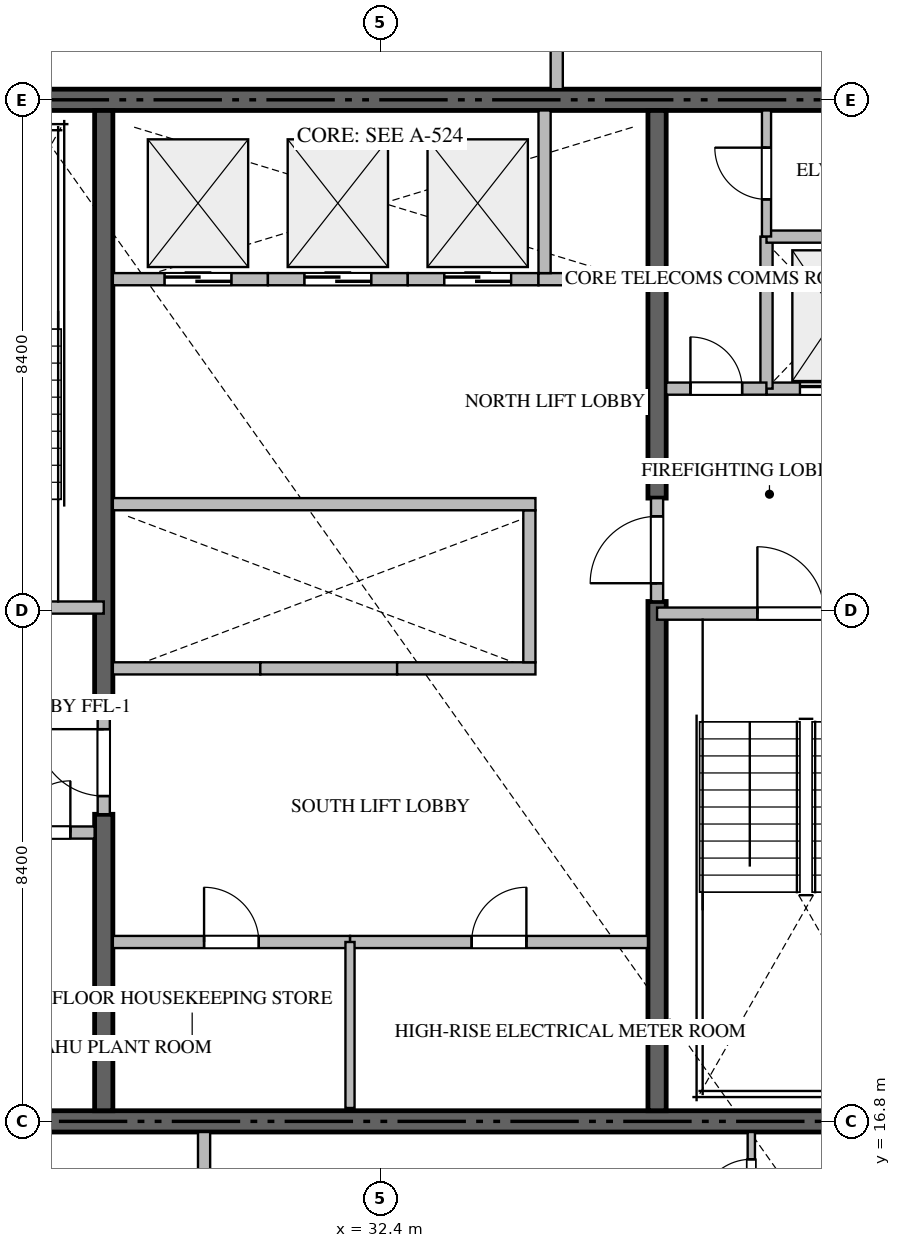
"""IFC4 building model, lengths in metres.
Left out: names, types, materials, properties, quantities, classifications, styles, units other than length and angle.
Written with IfcOpenShell. Run it as: python <this file> out.ifc"""

import sys

from ifc_helpers import new_model, si_unit, direction, frame, frame_2d, origin, place, context, subcontext, project, spatial, rectangle, extrude, source, transform, mapped, element, fill, save


model = new_model("IFC4")
c1 = context("Model", 3, precision=1e-05, world=origin(), true_north=direction((0.0, 1.0)))
c2 = subcontext(c1, "Body", "Model", "MODEL_VIEW")
j1 = project(units=[si_unit("LENGTHUNIT", "METRE"), si_unit("PLANEANGLEUNIT", "RADIAN")], contexts=[c1])
p1 = place(None, origin())
s1 = spatial("IfcSite", under=j1, at=p1, CompositionType="ELEMENT")
p2 = place(p1, origin())
s2 = spatial("IfcBuilding", under=s1, at=p2, CompositionType="ELEMENT")
p3 = place(p2, frame((0.0, 0.0, 210.45)))
s3 = spatial("IfcBuildingStorey", under=s2, at=p3, CompositionType="ELEMENT", Elevation=210.45)
for number, where, z_axis, x_axis in (
    (1, (23.4, 16.8, -0.44), (0.0, 0.0, 1.0), (1.0, 0.0, 0.0)),
    (2, (41.4, 33.6, -0.44), (0.0, 0.0, 1.0), (-1.0, 0.0, 0.0)),
):
    element("IfcWall", number, at=place(p3, frame(where, z_axis=z_axis, x_axis=x_axis)), inside=s3, PredefinedType="SHEAR", context=c2, shape_type="SweptSolid", body=[
        extrude(rectangle(XDim=18.0, YDim=0.35, at=frame_2d((9.0, 0.0))), origin(), (0.0, 0.0, 1.0), 4.028),
    ])
p4 = place(p3, frame((27.85, 16.975, -0.44), z_axis=(0.0, 0.0, 1.0), x_axis=(0.0, 1.0, 0.0)))
e3 = element("IfcWall", 3, at=p4, inside=s3, PredefinedType="SHEAR", context=c2, shape_type="SweptSolid", body=[
    extrude(rectangle(XDim=4.875, YDim=0.3, at=frame_2d((2.438, 0.0))), origin(), (0.0, 0.0, 1.0), 4.028),
])
p5 = place(p3, frame((27.85, 23.55, -0.44), z_axis=(0.0, 0.0, 1.0), x_axis=(0.0, 1.0, 0.0)))
e4 = element("IfcWall", 4, at=p5, inside=s3, PredefinedType="SHEAR", context=c2, shape_type="SweptSolid", body=[
    extrude(rectangle(XDim=9.875, YDim=0.3, at=frame_2d((4.938, 0.0))), origin(), (0.0, 0.0, 1.0), 4.028),
])
p6 = place(p3, frame((36.95, 16.975, -0.44), z_axis=(0.0, 0.0, 1.0), x_axis=(0.0, 1.0, 0.0)))
e5 = element("IfcWall", 5, at=p6, inside=s3, PredefinedType="SHEAR", context=c2, shape_type="SweptSolid", body=[
    extrude(rectangle(XDim=8.375, YDim=0.3, at=frame_2d((4.188, 0.0))), origin(), (0.0, 0.0, 1.0), 4.028),
])
p7 = place(p3, frame((36.95, 27.05, -0.44), z_axis=(0.0, 0.0, 1.0), x_axis=(0.0, 1.0, 0.0)))
e6 = element("IfcWall", 6, at=p7, inside=s3, PredefinedType="SHEAR", context=c2, shape_type="SweptSolid", body=[
    extrude(rectangle(XDim=6.375, YDim=0.3, at=frame_2d((3.188, 0.0))), origin(), (0.0, 0.0, 1.0), 4.028),
])
p8 = place(p3, frame((23.4, 25.25, 0.0), z_axis=(0.0, 0.0, 1.0), x_axis=(1.0, 0.0, 0.0)))
e7 = element("IfcWall", 7, at=p8, inside=s3, PredefinedType="STANDARD", context=c2, shape_type="SweptSolid", body=[
    extrude(rectangle(XDim=4.45, YDim=0.2, at=frame_2d((2.225, 0.0))), origin(), (0.0, 0.0, 1.0), 3.59),
])
p9 = place(p8, frame((1.65, 0.0, 0.0)))
e8 = element("IfcOpeningElement", 8, at=p9, cuts=e7, PredefinedType="OPENING", context=c2, shape_type="SweptSolid", body=[
    extrude(rectangle(XDim=1.1, YDim=2.15, at=frame_2d((0.55, 1.075))), frame((0.0, 0.11, 0.0), z_axis=(0.0, -1.0, 0.0), x_axis=(1.0, 0.0, 0.0)), (0.0, 0.0, 1.0), 0.22),
])
p10 = place(p3, frame((36.95, 25.15, 0.0), z_axis=(0.0, 0.0, 1.0), x_axis=(1.0, 0.0, 0.0)))
e9 = element("IfcWall", 9, at=p10, inside=s3, PredefinedType="STANDARD", context=c2, shape_type="SweptSolid", body=[
    extrude(rectangle(XDim=4.45, YDim=0.2, at=frame_2d((2.225, 0.0))), origin(), (0.0, 0.0, 1.0), 3.59),
])
p11 = place(p10, frame((1.65, 0.0, 0.0)))
e10 = element("IfcOpeningElement", 10, at=p11, cuts=e9, PredefinedType="OPENING", context=c2, shape_type="SweptSolid", body=[
    extrude(rectangle(XDim=1.1, YDim=2.15, at=frame_2d((0.55, 1.075))), frame((0.0, 0.11, 0.0), z_axis=(0.0, -1.0, 0.0), x_axis=(1.0, 0.0, 0.0)), (0.0, 0.0, 1.0), 0.22),
])
p12 = place(p3, frame((38.75, 28.85, 0.0), z_axis=(0.0, 0.0, 1.0), x_axis=(1.0, 0.0, 0.0)))
e11 = element("IfcWall", 11, at=p12, inside=s3, PredefinedType="STANDARD", context=c2, shape_type="SweptSolid", body=[
    extrude(rectangle(XDim=2.475, YDim=0.2, at=frame_2d((1.238, 0.0))), origin(), (0.0, 0.0, 1.0), 3.59),
])
p13 = place(p12, frame((0.55, 0.0, 0.0)))
e12 = element("IfcOpeningElement", 12, at=p13, cuts=e11, PredefinedType="OPENING", context=c2, shape_type="SweptSolid", body=[
    extrude(rectangle(XDim=1.2, YDim=2.2, at=frame_2d((0.6, 1.1))), frame((0.0, 0.11, 0.0), z_axis=(0.0, -1.0, 0.0), x_axis=(1.0, 0.0, 0.0)), (0.0, 0.0, 1.0), 0.22),
])
p14 = place(p3, frame((28.0, 24.25, 0.0), z_axis=(0.0, 0.0, 1.0), x_axis=(1.0, 0.0, 0.0)))
e13 = element("IfcWall", 13, at=p14, inside=s3, PredefinedType="STANDARD", context=c2, shape_type="SweptSolid", body=[
    extrude(rectangle(XDim=2.425, YDim=0.2, at=frame_2d((1.212, 0.0))), origin(), (0.0, 0.0, 1.0), 3.59),
])
p15 = place(p3, frame((30.425, 24.25, 0.0), z_axis=(0.0, 0.0, 1.0), x_axis=(1.0, 0.0, 0.0)))
e14 = element("IfcWall", 14, at=p15, inside=s3, PredefinedType="STANDARD", context=c2, shape_type="SweptSolid", body=[
    extrude(rectangle(XDim=2.25, YDim=0.2, at=frame_2d((1.125, 0.0))), origin(), (0.0, 0.0, 1.0), 3.59),
])
p16 = place(p3, frame((32.675, 24.25, 0.0), z_axis=(0.0, 0.0, 1.0), x_axis=(1.0, 0.0, 0.0)))
e15 = element("IfcWall", 15, at=p16, inside=s3, PredefinedType="STANDARD", context=c2, shape_type="SweptSolid", body=[
    extrude(rectangle(XDim=2.275, YDim=0.2, at=frame_2d((1.137, 0.0))), origin(), (0.0, 0.0, 1.0), 3.59),
])
p17 = place(p3, frame((34.85, 24.35, 0.0), z_axis=(0.0, 0.0, 1.0), x_axis=(0.0, 1.0, 0.0)))
e16 = element("IfcWall", 16, at=p17, inside=s3, PredefinedType="STANDARD", context=c2, shape_type="SweptSolid", body=[
    extrude(rectangle(XDim=2.5, YDim=0.2, at=frame_2d((1.25, 0.0))), origin(), (0.0, 0.0, 1.0), 3.59),
])
p18 = place(p3, frame((28.0, 30.65, 0.0), z_axis=(0.0, 0.0, 1.0), x_axis=(1.0, 0.0, 0.0)))
e17 = element("IfcWall", 17, at=p18, inside=s3, PredefinedType="STANDARD", context=c2, shape_type="SweptSolid", body=[
    extrude(rectangle(XDim=2.55, YDim=0.2, at=frame_2d((1.275, 0.0))), origin(), (0.0, 0.0, 1.0), 3.59),
])
p19 = place(p18, frame((0.85, 0.0, 0.0)))
e18 = element("IfcOpeningElement", 18, at=p19, cuts=e17, PredefinedType="OPENING", context=c2, shape_type="SweptSolid", body=[
    extrude(rectangle(XDim=1.1, YDim=2.2, at=frame_2d((0.55, 1.1))), frame((0.0, 0.11, 0.0), z_axis=(0.0, -1.0, 0.0), x_axis=(1.0, 0.0, 0.0)), (0.0, 0.0, 1.0), 0.22),
])
p20 = place(p3, frame((30.55, 30.65, 0.0), z_axis=(0.0, 0.0, 1.0), x_axis=(1.0, 0.0, 0.0)))
e19 = element("IfcWall", 19, at=p20, inside=s3, PredefinedType="STANDARD", context=c2, shape_type="SweptSolid", body=[
    extrude(rectangle(XDim=2.3, YDim=0.2, at=frame_2d((1.15, 0.0))), origin(), (0.0, 0.0, 1.0), 3.59),
])
p21 = place(p20, frame((0.6, 0.0, 0.0)))
e20 = element("IfcOpeningElement", 20, at=p21, cuts=e19, PredefinedType="OPENING", context=c2, shape_type="SweptSolid", body=[
    extrude(rectangle(XDim=1.1, YDim=2.2, at=frame_2d((0.55, 1.1))), frame((0.0, 0.11, 0.0), z_axis=(0.0, -1.0, 0.0), x_axis=(1.0, 0.0, 0.0)), (0.0, 0.0, 1.0), 0.22),
])
p22 = place(p3, frame((32.85, 30.65, 0.0), z_axis=(0.0, 0.0, 1.0), x_axis=(1.0, 0.0, 0.0)))
e21 = element("IfcWall", 21, at=p22, inside=s3, PredefinedType="STANDARD", context=c2, shape_type="SweptSolid", body=[
    extrude(rectangle(XDim=2.15, YDim=0.2, at=frame_2d((1.075, 0.0))), origin(), (0.0, 0.0, 1.0), 3.59),
])
p23 = place(p22, frame((0.6, 0.0, 0.0)))
e22 = element("IfcOpeningElement", 22, at=p23, cuts=e21, PredefinedType="OPENING", context=c2, shape_type="SweptSolid", body=[
    extrude(rectangle(XDim=1.1, YDim=2.2, at=frame_2d((0.55, 1.1))), frame((0.0, 0.11, 0.0), z_axis=(0.0, -1.0, 0.0), x_axis=(1.0, 0.0, 0.0)), (0.0, 0.0, 1.0), 0.22),
])
p24 = place(p3, frame((35.0, 30.65, 0.0), z_axis=(0.0, 0.0, 1.0), x_axis=(1.0, 0.0, 0.0)))
e23 = element("IfcWall", 23, at=p24, inside=s3, PredefinedType="STANDARD", context=c2, shape_type="SweptSolid", body=[
    extrude(rectangle(XDim=1.8, YDim=0.2, at=frame_2d((0.9, 0.0))), origin(), (0.0, 0.0, 1.0), 3.59),
])
p25 = place(p3, frame((35.1, 30.75, 0.0), z_axis=(0.0, 0.0, 1.0), x_axis=(0.0, 1.0, 0.0)))
e24 = element("IfcWall", 24, at=p25, inside=s3, PredefinedType="STANDARD", context=c2, shape_type="SweptSolid", body=[
    extrude(rectangle(XDim=2.675, YDim=0.2, at=frame_2d((1.337, 0.0))), origin(), (0.0, 0.0, 1.0), 3.59),
])
p26 = place(p3, frame((26.052, 21.55, 0.0), z_axis=(0.0, 0.0, 1.0), x_axis=(1.0, 0.0, 0.0)))
e25 = element("IfcWall", 25, at=p26, inside=s3, PredefinedType="STANDARD", context=c2, shape_type="SweptSolid", body=[
    extrude(rectangle(XDim=1.648, YDim=0.2, at=frame_2d((0.824, 0.0))), origin(), (0.0, 0.0, 1.0), 3.59),
])
p27 = place(p26, frame((0.399, 0.0, 0.0)))
e26 = element("IfcOpeningElement", 26, at=p27, cuts=e25, PredefinedType="OPENING", context=c2, shape_type="SweptSolid", body=[
    extrude(rectangle(XDim=0.85, YDim=2.1, at=frame_2d((0.425, 1.05))), frame((0.0, 0.11, 0.0), z_axis=(0.0, -1.0, 0.0), x_axis=(1.0, 0.0, 0.0)), (0.0, 0.0, 1.0), 0.22),
])
p28 = place(p3, frame((38.75, 28.85, 0.0), z_axis=(0.0, 0.0, 1.0), x_axis=(0.0, 1.0, 0.0)))
e27 = element("IfcWall", 27, at=p28, inside=s3, PredefinedType="STANDARD", context=c2, shape_type="SweptSolid", body=[
    extrude(rectangle(XDim=2.5, YDim=0.2, at=frame_2d((1.25, 0.0))), origin(), (0.0, 0.0, 1.0), 3.59),
])
p29 = place(p3, frame((38.75, 31.35, 0.0), z_axis=(0.0, 0.0, 1.0), x_axis=(1.0, 0.0, 0.0)))
e28 = element("IfcWall", 28, at=p29, inside=s3, PredefinedType="STANDARD", context=c2, shape_type="SweptSolid", body=[
    extrude(rectangle(XDim=2.475, YDim=0.2, at=frame_2d((1.238, 0.0))), origin(), (0.0, 0.0, 1.0), 3.59),
])
p30 = place(p3, frame((37.1, 28.85, 0.0), z_axis=(0.0, 0.0, 1.0), x_axis=(1.0, 0.0, 0.0)))
e29 = element("IfcWall", 29, at=p30, inside=s3, PredefinedType="STANDARD", context=c2, shape_type="SweptSolid", body=[
    extrude(rectangle(XDim=1.648, YDim=0.2, at=frame_2d((0.824, 0.0))), origin(), (0.0, 0.0, 1.0), 3.59),
])
p31 = place(p30, frame((0.399, 0.0, 0.0)))
e30 = element("IfcOpeningElement", 30, at=p31, cuts=e29, PredefinedType="OPENING", context=c2, shape_type="SweptSolid", body=[
    extrude(rectangle(XDim=0.85, YDim=2.1, at=frame_2d((0.425, 1.05))), frame((0.0, 0.11, 0.0), z_axis=(0.0, -1.0, 0.0), x_axis=(1.0, 0.0, 0.0)), (0.0, 0.0, 1.0), 0.22),
])
p32 = place(p3, frame((27.85, 21.852, 0.0), z_axis=(0.0, 0.0, 1.0), x_axis=(0.0, 1.0, 0.0)))
e31 = element("IfcWall", 31, at=p32, inside=s3, PredefinedType="STANDARD", context=c2, shape_type="SweptSolid", body=[
    extrude(rectangle(XDim=1.696, YDim=0.2, at=frame_2d((0.848, 0.0))), origin(), (0.0, 0.0, 1.0), 3.59),
])
p33 = place(p32, frame((0.298, 0.0, 0.0)))
e32 = element("IfcOpeningElement", 32, at=p33, cuts=e31, PredefinedType="OPENING", context=c2, shape_type="SweptSolid", body=[
    extrude(rectangle(XDim=1.1, YDim=2.15, at=frame_2d((0.55, 1.075))), frame((0.0, 0.11, 0.0), z_axis=(0.0, -1.0, 0.0), x_axis=(1.0, 0.0, 0.0)), (0.0, 0.0, 1.0), 0.22),
])
p34 = place(p3, frame((36.95, 25.352, 0.0), z_axis=(0.0, 0.0, 1.0), x_axis=(0.0, 1.0, 0.0)))
e33 = element("IfcWall", 33, at=p34, inside=s3, PredefinedType="STANDARD", context=c2, shape_type="SweptSolid", body=[
    extrude(rectangle(XDim=1.696, YDim=0.2, at=frame_2d((0.848, 0.0))), origin(), (0.0, 0.0, 1.0), 3.59),
])
p35 = place(p34, frame((0.298, 0.0, 0.0)))
e34 = element("IfcOpeningElement", 34, at=p35, cuts=e33, PredefinedType="OPENING", context=c2, shape_type="SweptSolid", body=[
    extrude(rectangle(XDim=1.1, YDim=2.15, at=frame_2d((0.55, 1.075))), frame((0.0, 0.11, 0.0), z_axis=(0.0, -1.0, 0.0), x_axis=(1.0, 0.0, 0.0)), (0.0, 0.0, 1.0), 0.22),
])
p36 = place(p3, frame((28.0, 26.95, 0.0), z_axis=(0.0, 0.0, 1.0), x_axis=(1.0, 0.0, 0.0)))
e35 = element("IfcWall", 35, at=p36, inside=s3, PredefinedType="STANDARD", context=c2, shape_type="SweptSolid", body=[
    extrude(rectangle(XDim=6.95, YDim=0.2, at=frame_2d((3.475, 0.0))), origin(), (0.0, 0.0, 1.0), 3.59),
])
p37 = place(p3, frame((38.75, 31.352, 0.0), z_axis=(0.0, 0.0, 1.0), x_axis=(0.0, 1.0, 0.0)))
e36 = element("IfcWall", 36, at=p37, inside=s3, PredefinedType="PARTITIONING", context=c2, shape_type="SweptSolid", body=[
    extrude(rectangle(XDim=2.073, YDim=0.15, at=frame_2d((1.037, 0.0))), origin(), (0.0, 0.0, 1.0), 3.59),
])
p38 = place(p37, frame((0.611, 0.0, 0.0)))
e37 = element("IfcOpeningElement", 37, at=p38, cuts=e36, PredefinedType="OPENING", context=c2, shape_type="SweptSolid", body=[
    extrude(rectangle(XDim=0.85, YDim=2.1, at=frame_2d((0.425, 1.05))), frame((0.0, 0.085, 0.0), z_axis=(0.0, -1.0, 0.0), x_axis=(1.0, 0.0, 0.0)), (0.0, 0.0, 1.0), 0.17),
])
p39 = place(p3, frame((28.0, 19.75, 0.0), z_axis=(0.0, 0.0, 1.0), x_axis=(1.0, 0.0, 0.0)))
e38 = element("IfcWall", 38, at=p39, inside=s3, PredefinedType="STANDARD", context=c2, shape_type="SweptSolid", body=[
    extrude(rectangle(XDim=3.9, YDim=0.2, at=frame_2d((1.95, 0.0))), origin(), (0.0, 0.0, 1.0), 3.59),
])
p40 = place(p39, frame((1.5, 0.0, 0.0)))
e39 = element("IfcOpeningElement", 39, at=p40, cuts=e38, PredefinedType="OPENING", context=c2, shape_type="SweptSolid", body=[
    extrude(rectangle(XDim=0.9, YDim=2.1, at=frame_2d((0.45, 1.05))), frame((0.0, 0.11, 0.0), z_axis=(0.0, -1.0, 0.0), x_axis=(1.0, 0.0, 0.0)), (0.0, 0.0, 1.0), 0.22),
])
p41 = place(p3, frame((31.902, 19.75, 0.0), z_axis=(0.0, 0.0, 1.0), x_axis=(1.0, 0.0, 0.0)))
e40 = element("IfcWall", 40, at=p41, inside=s3, PredefinedType="STANDARD", context=c2, shape_type="SweptSolid", body=[
    extrude(rectangle(XDim=4.898, YDim=0.2, at=frame_2d((2.449, 0.0))), origin(), (0.0, 0.0, 1.0), 3.59),
])
p42 = place(p41, frame((1.999, 0.0, 0.0)))
e41 = element("IfcOpeningElement", 41, at=p42, cuts=e40, PredefinedType="OPENING", context=c2, shape_type="SweptSolid", body=[
    extrude(rectangle(XDim=0.9, YDim=2.1, at=frame_2d((0.45, 1.05))), frame((0.0, 0.11, 0.0), z_axis=(0.0, -1.0, 0.0), x_axis=(1.0, 0.0, 0.0)), (0.0, 0.0, 1.0), 0.22),
])
p43 = place(p3, frame((31.9, 17.02, 0.0), z_axis=(0.0, 0.0, 1.0), x_axis=(0.0, 1.0, 0.0)))
e42 = element("IfcWall", 42, at=p43, inside=s3, PredefinedType="PARTITIONING", context=c2, shape_type="SweptSolid", body=[
    extrude(rectangle(XDim=2.73, YDim=0.15, at=frame_2d((1.365, 0.0))), origin(), (0.0, 0.0, 1.0), 3.59),
])
for number, where, z_axis, x_axis in (
    (43, (29.5, 1.282, 0.0), (0.0, 0.0, 1.0), (0.0, 1.0, 0.0)),
    (44, (35.3, 33.775, 0.0), (0.0, 0.0, 1.0), (0.0, 1.0, 0.0)),
):
    element("IfcWall", number, at=place(p3, frame(where, z_axis=z_axis, x_axis=x_axis)), inside=s3, PredefinedType="PARTITIONING", context=c2, shape_type="SweptSolid", body=[
        extrude(rectangle(XDim=15.343, YDim=0.2, at=frame_2d((7.671, 0.0))), origin(), (0.0, 0.0, 1.0), 3.59),
    ])
p44 = place(p3, frame((38.5, 14.752, 0.0), z_axis=(0.0, 0.0, 1.0), x_axis=(0.0, 1.0, 0.0)))
e45 = element("IfcWall", 45, at=p44, inside=s3, PredefinedType="PARTITIONING", context=c2, shape_type="SweptSolid", body=[
    extrude(rectangle(XDim=1.873, YDim=0.12, at=frame_2d((0.937, 0.0))), origin(), (0.0, 0.0, 1.0), 3.59),
])
p45 = place(p44, frame((0.575, 0.0, 0.0)))
e46 = element("IfcOpeningElement", 46, at=p45, cuts=e45, PredefinedType="OPENING", context=c2, shape_type="SweptSolid", body=[
    extrude(rectangle(XDim=0.85, YDim=2.1, at=frame_2d((0.425, 1.05))), frame((0.0, 0.07, 0.0), z_axis=(0.0, -1.0, 0.0), x_axis=(1.0, 0.0, 0.0)), (0.0, 0.0, 1.0), 0.14),
])
m1 = source(origin(), c2, "Body", "SweptSolid", [
    extrude(rectangle(XDim=1.1, YDim=2.15, at=frame_2d((0.55, 1.075))), frame((0.0, 0.025, 0.0), z_axis=(0.0, -1.0, 0.0), x_axis=(1.0, 0.0, 0.0)), (0.0, 0.0, 1.0), 0.05),
])
p46 = place(p11, origin())
e47 = element("IfcDoor", 47, at=p46, inside=s3, OperationType="SINGLE_SWING_LEFT", PredefinedType="DOOR", context=c2, shape_type="MappedRepresentation", body=[
    mapped(m1, transform((0.0, 0.0, 0.0), scale=1.0)),
])
fill(e10, e47)
m2 = source(origin(), c2, "Body", "SweptSolid", [
    extrude(rectangle(XDim=1.2, YDim=2.2, at=frame_2d((0.6, 1.1))), frame((0.0, 0.025, 0.0), z_axis=(0.0, -1.0, 0.0), x_axis=(1.0, 0.0, 0.0)), (0.0, 0.0, 1.0), 0.05),
])
p47 = place(p13, origin())
e48 = element("IfcDoor", 48, at=p47, inside=s3, OperationType="DOUBLE_DOOR_SLIDING", PredefinedType="DOOR", context=c2, shape_type="MappedRepresentation", body=[
    mapped(m2, transform((0.0, 0.0, 0.0), scale=1.0)),
])
fill(e12, e48)
m3 = source(origin(), c2, "Body", "SweptSolid", [
    extrude(rectangle(XDim=1.1, YDim=2.2, at=frame_2d((0.55, 1.1))), frame((0.0, 0.025, 0.0), z_axis=(0.0, -1.0, 0.0), x_axis=(1.0, 0.0, 0.0)), (0.0, 0.0, 1.0), 0.05),
])
p48 = place(p19, origin())
e49 = element("IfcDoor", 49, at=p48, inside=s3, OperationType="DOUBLE_DOOR_SLIDING", PredefinedType="DOOR", context=c2, shape_type="MappedRepresentation", body=[
    mapped(m3, transform((0.0, 0.0, 0.0), scale=1.0)),
])
fill(e18, e49)
p49 = place(p21, origin())
e50 = element("IfcDoor", 50, at=p49, inside=s3, OperationType="DOUBLE_DOOR_SLIDING", PredefinedType="DOOR", context=c2, shape_type="MappedRepresentation", body=[
    mapped(m3, transform((0.0, 0.0, 0.0), scale=1.0)),
])
fill(e20, e50)
p50 = place(p23, origin())
e51 = element("IfcDoor", 51, at=p50, inside=s3, OperationType="DOUBLE_DOOR_SLIDING", PredefinedType="DOOR", context=c2, shape_type="MappedRepresentation", body=[
    mapped(m3, transform((0.0, 0.0, 0.0), scale=1.0)),
])
fill(e22, e51)
m4 = source(origin(), c2, "Body", "SweptSolid", [
    extrude(rectangle(XDim=0.85, YDim=2.1, at=frame_2d((0.425, 1.05))), frame((0.0, 0.025, 0.0), z_axis=(0.0, -1.0, 0.0), x_axis=(1.0, 0.0, 0.0)), (0.0, 0.0, 1.0), 0.05),
])
p51 = place(p27, origin())
e52 = element("IfcDoor", 52, at=p51, inside=s3, OperationType="SINGLE_SWING_RIGHT", PredefinedType="DOOR", context=c2, shape_type="MappedRepresentation", body=[
    mapped(m4, transform((0.0, 0.0, 0.0), scale=1.0)),
])
fill(e26, e52)
p52 = place(p31, origin())
e53 = element("IfcDoor", 53, at=p52, inside=s3, OperationType="SINGLE_SWING_LEFT", PredefinedType="DOOR", context=c2, shape_type="MappedRepresentation", body=[
    mapped(m4, transform((0.0, 0.0, 0.0), scale=1.0)),
])
fill(e30, e53)
p53 = place(p33, origin())
e54 = element("IfcDoor", 54, at=p53, inside=s3, OperationType="SINGLE_SWING_RIGHT", PredefinedType="DOOR", context=c2, shape_type="MappedRepresentation", body=[
    mapped(m1, transform((0.0, 0.0, 0.0), scale=1.0)),
])
fill(e32, e54)
p54 = place(p35, origin())
e55 = element("IfcDoor", 55, at=p54, inside=s3, OperationType="SINGLE_SWING_LEFT", PredefinedType="DOOR", context=c2, shape_type="MappedRepresentation", body=[
    mapped(m1, transform((0.0, 0.0, 0.0), scale=1.0)),
])
fill(e34, e55)
p55 = place(p38, origin())
e56 = element("IfcDoor", 56, at=p55, inside=s3, OperationType="SINGLE_SWING_RIGHT", PredefinedType="DOOR", context=c2, shape_type="MappedRepresentation", body=[
    mapped(m4, transform((0.0, 0.0, 0.0), scale=1.0)),
])
fill(e37, e56)
m5 = source(origin(), c2, "Body", "SweptSolid", [
    extrude(rectangle(XDim=0.9, YDim=2.1, at=frame_2d((0.45, 1.05))), frame((0.0, 0.025, 0.0), z_axis=(0.0, -1.0, 0.0), x_axis=(1.0, 0.0, 0.0)), (0.0, 0.0, 1.0), 0.05),
])
p56 = place(p40, origin())
e57 = element("IfcDoor", 57, at=p56, inside=s3, OperationType="SINGLE_SWING_LEFT", PredefinedType="DOOR", context=c2, shape_type="MappedRepresentation", body=[
    mapped(m5, transform((0.0, 0.0, 0.0), scale=1.0)),
])
fill(e39, e57)
p57 = place(p42, origin())
e58 = element("IfcDoor", 58, at=p57, inside=s3, OperationType="SINGLE_SWING_RIGHT", PredefinedType="DOOR", context=c2, shape_type="MappedRepresentation", body=[
    mapped(m5, transform((0.0, 0.0, 0.0), scale=1.0)),
])
fill(e41, e58)
p58 = place(p45, origin())
e59 = element("IfcDoor", 59, at=p58, inside=s3, OperationType="SINGLE_SWING_LEFT", PredefinedType="DOOR", context=c2, shape_type="MappedRepresentation", body=[
    mapped(m4, transform((0.0, 0.0, 0.0), scale=1.0)),
])
fill(e46, e59)
save(model, sys.argv[1])
